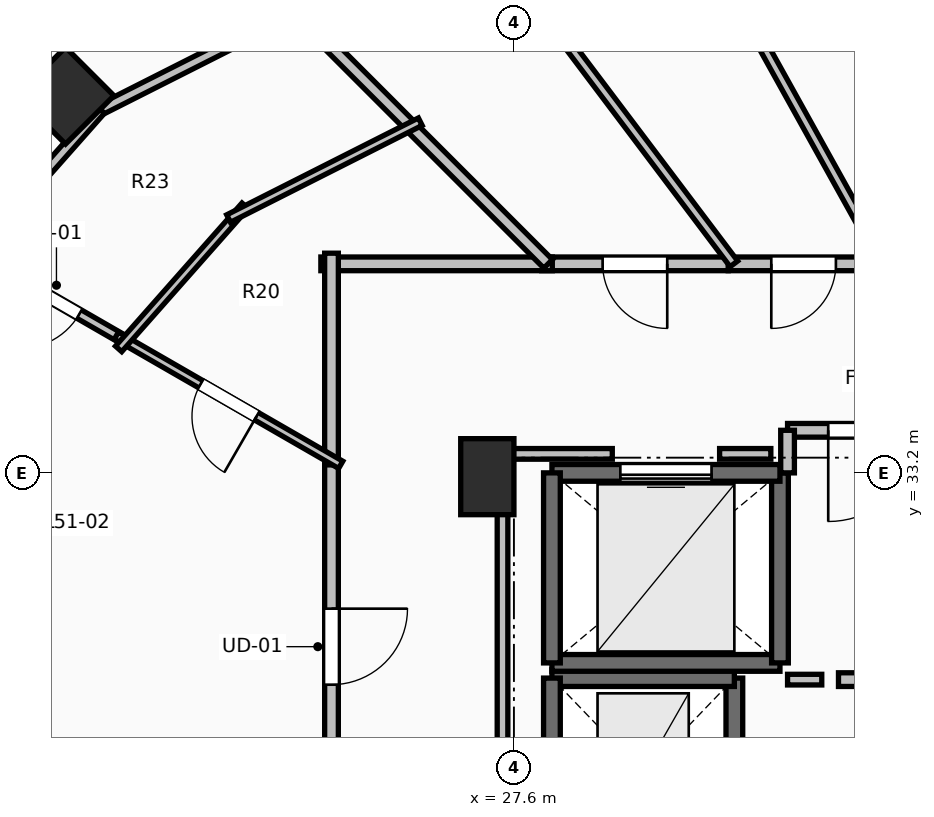
"""IFC4 building model, lengths in metres.
Left out: names, types, materials, properties, quantities, classifications, styles, units other than length and angle.
Written with IfcOpenShell. Run it as: python <this file> out.ifc"""

import sys

from ifc_helpers import new_model, si_unit, direction, frame, frame_2d, origin, origin_2d, place, context, subcontext, project, spatial, rectangle, extrude, element, fill, save


model = new_model("IFC4")
c1 = context("Model", 3, precision=1e-05, world=origin(), true_north=direction((0.0, 1.0)))
c2 = subcontext(c1, "Body", "Model", "MODEL_VIEW")
j1 = project(units=[si_unit("LENGTHUNIT", "METRE"), si_unit("PLANEANGLEUNIT", "RADIAN")], contexts=[c1])
p1 = place(None, origin())
s1 = spatial("IfcSite", under=j1, at=p1, CompositionType="ELEMENT")
p2 = place(p1, origin())
s2 = spatial("IfcBuilding", under=s1, at=p2, CompositionType="ELEMENT")
p3 = place(p2, frame((0.0, 0.0, 189.6)))
s3 = spatial("IfcBuildingStorey", under=s2, at=p3, CompositionType="ELEMENT", Elevation=189.6)
p4 = place(p3, frame((21.701, 38.162, 0.0), z_axis=(0.0, 0.0, 1.0), x_axis=(-0.707106781187, 0.707106781187, 0.0)))
e1 = element("IfcColumn", 1, at=p4, inside=s3, PredefinedType="COLUMN", context=c2, shape_type="SweptSolid", body=[
    extrude(rectangle(XDim=0.9, YDim=0.9, at=origin_2d()), origin(), (0.0, 0.0, 1.0), 3.5),
])
p5 = place(p3, frame((27.25, 33.15, 0.0), z_axis=(0.0, 0.0, 1.0), x_axis=(1.0, 0.0, 0.0)))
e2 = element("IfcColumn", 2, at=p5, inside=s3, PredefinedType="PILASTER", context=c2, shape_type="SweptSolid", body=[
    extrude(rectangle(XDim=0.7, YDim=1.0, at=origin_2d()), origin(), (0.0, 0.0, 1.0), 3.5),
])
p6 = place(p3, frame((30.5, 28.0, 0.0), z_axis=(0.0, 0.0, 1.0), x_axis=(0.0, 1.0, 0.0)))
e3 = element("IfcWall", 3, at=p6, inside=s3, PredefinedType="SHEAR", context=c2, shape_type="SweptSolid", body=[
    extrude(rectangle(XDim=2.5, YDim=0.22, at=frame_2d((1.25, 0.0))), origin(), (0.0, 0.0, 1.0), 3.24),
])
p7 = place(p3, frame((30.5, 30.5, 0.0), z_axis=(0.0, 0.0, 1.0), x_axis=(-1.0, 0.0, 0.0)))
e4 = element("IfcWall", 4, at=p7, inside=s3, PredefinedType="SHEAR", context=c2, shape_type="SweptSolid", body=[
    extrude(rectangle(XDim=2.4, YDim=0.22, at=frame_2d((1.2, 0.0))), origin(), (0.0, 0.0, 1.0), 3.24),
])
p8 = place(p3, frame((28.1, 30.5, 0.0), z_axis=(0.0, 0.0, 1.0), x_axis=(0.0, -1.0, 0.0)))
e5 = element("IfcWall", 5, at=p8, inside=s3, PredefinedType="SHEAR", context=c2, shape_type="SweptSolid", body=[
    extrude(rectangle(XDim=2.5, YDim=0.22, at=frame_2d((1.25, 0.0))), origin(), (0.0, 0.0, 1.0), 3.24),
])
p9 = place(p3, frame((28.1, 30.7, 0.0), z_axis=(0.0, 0.0, 1.0), x_axis=(1.0, 0.0, 0.0)))
e6 = element("IfcWall", 6, at=p9, inside=s3, PredefinedType="SOLIDWALL", context=c2, shape_type="SweptSolid", body=[
    extrude(rectangle(XDim=3.0, YDim=0.22, at=frame_2d((1.5, 0.0))), origin(), (0.0, 0.0, 1.0), 3.24),
])
p10 = place(p3, frame((31.1, 30.7, 0.0), z_axis=(0.0, 0.0, 1.0), x_axis=(0.0, 1.0, 0.0)))
e7 = element("IfcWall", 7, at=p10, inside=s3, PredefinedType="SOLIDWALL", context=c2, shape_type="SweptSolid", body=[
    extrude(rectangle(XDim=2.5, YDim=0.22, at=frame_2d((1.25, 0.0))), origin(), (0.0, 0.0, 1.0), 3.24),
])
p11 = place(p3, frame((31.1, 33.2, 0.0), z_axis=(0.0, 0.0, 1.0), x_axis=(-1.0, 0.0, 0.0)))
e8 = element("IfcWall", 8, at=p11, inside=s3, PredefinedType="SOLIDWALL", context=c2, shape_type="SweptSolid", body=[
    extrude(rectangle(XDim=3.0, YDim=0.22, at=frame_2d((1.5, 0.0))), origin(), (0.0, 0.0, 1.0), 3.24),
])
p12 = place(p11, frame((0.9, 0.0, 0.0)))
e9 = element("IfcOpeningElement", 9, at=p12, cuts=e8, PredefinedType="OPENING", context=c2, shape_type="SweptSolid", body=[
    extrude(rectangle(XDim=1.2, YDim=2.2, at=frame_2d((0.6, 1.1))), frame((0.0, 0.125, 0.0), z_axis=(0.0, -1.0, 0.0), x_axis=(1.0, 0.0, 0.0)), (0.0, 0.0, 1.0), 0.25),
])
p13 = place(p3, frame((28.1, 33.2, 0.0), z_axis=(0.0, 0.0, 1.0), x_axis=(0.0, -1.0, 0.0)))
e10 = element("IfcWall", 10, at=p13, inside=s3, PredefinedType="SOLIDWALL", context=c2, shape_type="SweptSolid", body=[
    extrude(rectangle(XDim=2.5, YDim=0.22, at=frame_2d((1.25, 0.0))), origin(), (0.0, 0.0, 1.0), 3.24),
])
p14 = place(p3, frame((31.87, 30.48, 0.0), z_axis=(0.0, 0.0, 1.0), x_axis=(1.0, 0.0, 0.0)))
e11 = element("IfcWall", 11, at=p14, inside=s3, PredefinedType="PARTITIONING", context=c2, shape_type="SweptSolid", body=[
    extrude(rectangle(XDim=1.6, YDim=0.18, at=frame_2d((0.8, 0.0))), origin(), (0.0, 0.0, 1.0), 3.24),
])
p15 = place(p3, frame((33.47, 33.76, 0.0), z_axis=(0.0, 0.0, 1.0), x_axis=(-1.0, 0.0, 0.0)))
e12 = element("IfcWall", 12, at=p15, inside=s3, PredefinedType="PARTITIONING", context=c2, shape_type="SweptSolid", body=[
    extrude(rectangle(XDim=2.27, YDim=0.18, at=frame_2d((1.135, 0.0))), origin(), (0.0, 0.0, 1.0), 3.24),
])
p16 = place(p15, frame((0.535, 0.0, 0.0)))
e13 = element("IfcOpeningElement", 13, at=p16, cuts=e12, PredefinedType="OPENING", context=c2, shape_type="SweptSolid", body=[
    extrude(rectangle(XDim=1.2, YDim=2.15, at=frame_2d((0.6, 1.075))), frame((0.0, 0.105, 0.0), z_axis=(0.0, -1.0, 0.0), x_axis=(1.0, 0.0, 0.0)), (0.0, 0.0, 1.0), 0.21),
])
p17 = place(p3, frame((31.2, 33.76, 0.0), z_axis=(0.0, 0.0, 1.0), x_axis=(0.0, -1.0, 0.0)))
e14 = element("IfcWall", 14, at=p17, inside=s3, PredefinedType="PARTITIONING", context=c2, shape_type="SweptSolid", body=[
    extrude(rectangle(XDim=0.56, YDim=0.18, at=frame_2d((0.28, 0.0))), origin(), (0.0, 0.0, 1.0), 3.24),
])
p18 = place(p3, frame((32.403, 35.95, 0.0), z_axis=(0.0, 0.0, 1.0), x_axis=(-1.0, 0.0, 0.0)))
e15 = element("IfcWall", 15, at=p18, inside=s3, PredefinedType="PARTITIONING", context=c2, shape_type="SweptSolid", body=[
    extrude(rectangle(XDim=1.984, YDim=0.18, at=frame_2d((0.992, 0.0))), origin(), (0.0, 0.0, 1.0), 2.432),
])
p19 = place(p18, frame((0.567, 0.0, 0.0)))
e16 = element("IfcOpeningElement", 16, at=p19, cuts=e15, PredefinedType="OPENING", context=c2, shape_type="SweptSolid", body=[
    extrude(rectangle(XDim=0.85, YDim=2.1, at=frame_2d((0.425, 1.05))), frame((0.0, 0.105, 0.0), z_axis=(0.0, -1.0, 0.0), x_axis=(1.0, 0.0, 0.0)), (0.0, 0.0, 1.0), 0.21),
])
p20 = place(p3, frame((30.419, 35.95, 0.0), z_axis=(0.0, 0.0, 1.0), x_axis=(-1.0, 0.0, 0.0)))
e17 = element("IfcWall", 17, at=p20, inside=s3, PredefinedType="PARTITIONING", context=c2, shape_type="SweptSolid", body=[
    extrude(rectangle(XDim=2.454, YDim=0.18, at=frame_2d((1.227, 0.0))), origin(), (0.0, 0.0, 1.0), 2.432),
])
p21 = place(p20, frame((0.802, 0.0, 0.0)))
e18 = element("IfcOpeningElement", 18, at=p21, cuts=e17, PredefinedType="OPENING", context=c2, shape_type="SweptSolid", body=[
    extrude(rectangle(XDim=0.85, YDim=2.1, at=frame_2d((0.425, 1.05))), frame((0.0, 0.105, 0.0), z_axis=(0.0, -1.0, 0.0), x_axis=(1.0, 0.0, 0.0)), (0.0, 0.0, 1.0), 0.21),
])
p22 = place(p3, frame((25.2, 33.445, 0.0), z_axis=(0.0, 0.0, 1.0), x_axis=(0.0, -1.0, 0.0)))
e19 = element("IfcWall", 19, at=p22, inside=s3, PredefinedType="PARTITIONING", context=c2, shape_type="SweptSolid", body=[
    extrude(rectangle(XDim=5.063, YDim=0.18, at=frame_2d((2.531, 0.0))), origin(), (0.0, 0.0, 1.0), 2.432),
])
p23 = place(p22, frame((2.031, 0.0, 0.0)))
e20 = element("IfcOpeningElement", 20, at=p23, cuts=e19, PredefinedType="OPENING", context=c2, shape_type="SweptSolid", body=[
    extrude(rectangle(XDim=1.0, YDim=2.15, at=frame_2d((0.5, 1.075))), frame((0.0, 0.105, 0.0), z_axis=(0.0, -1.0, 0.0), x_axis=(1.0, 0.0, 0.0)), (0.0, 0.0, 1.0), 0.21),
])
p24 = place(p3, frame((28.105, 35.95, 0.0), z_axis=(0.0, 0.0, 1.0), x_axis=(-1.0, 0.0, 0.0)))
e21 = element("IfcWall", 21, at=p24, inside=s3, PredefinedType="PARTITIONING", context=c2, shape_type="SweptSolid", body=[
    extrude(rectangle(XDim=3.045, YDim=0.18, at=frame_2d((1.522, 0.0))), origin(), (0.0, 0.0, 1.0), 2.432),
])
p25 = place(p3, frame((25.2, 36.09, 0.0), z_axis=(0.0, 0.0, 1.0), x_axis=(0.0, -1.0, 0.0)))
e22 = element("IfcWall", 22, at=p25, inside=s3, PredefinedType="PARTITIONING", context=c2, shape_type="SweptSolid", body=[
    extrude(rectangle(XDim=2.785, YDim=0.18, at=frame_2d((1.393, 0.0))), origin(), (0.0, 0.0, 1.0), 2.432),
])
p26 = place(p3, frame((30.135, 46.398, 0.0), z_axis=(0.0, 0.0, 1.0), x_axis=(0.359727007777, -0.933057597298, 0.0)))
e23 = element("IfcWall", 23, at=p26, inside=s3, PredefinedType="PARTITIONING", context=c2, shape_type="SweptSolid", body=[
    extrude(rectangle(XDim=11.198, YDim=0.125, at=frame_2d((5.599, 0.0))), origin(), (0.0, 0.0, 1.0), 2.432),
])
p27 = place(p3, frame((27.069, 45.673, 0.0), z_axis=(0.0, 0.0, 1.0), x_axis=(0.485717471054, -0.874115860921, 0.0)))
e24 = element("IfcWall", 24, at=p27, inside=s3, PredefinedType="PARTITIONING", context=c2, shape_type="SweptSolid", body=[
    extrude(rectangle(XDim=11.123, YDim=0.125, at=frame_2d((5.562, 0.0))), origin(), (0.0, 0.0, 1.0), 2.432),
])
p28 = place(p3, frame((24.075, 44.46, 0.0), z_axis=(0.0, 0.0, 1.0), x_axis=(0.602185523072, -0.798356183544, 0.0)))
e25 = element("IfcWall", 25, at=p28, inside=s3, PredefinedType="PARTITIONING", context=c2, shape_type="SweptSolid", body=[
    extrude(rectangle(XDim=10.659, YDim=0.125, at=frame_2d((5.33, 0.0))), origin(), (0.0, 0.0, 1.0), 2.432),
])
p29 = place(p3, frame((21.041, 42.959, 0.0), z_axis=(0.0, 0.0, 1.0), x_axis=(0.707106781187, -0.707106781187, 0.0)))
e26 = element("IfcWall", 26, at=p29, inside=s3, PredefinedType="PARTITIONING", context=c2, shape_type="SweptSolid", body=[
    extrude(rectangle(XDim=9.912, YDim=0.16, at=frame_2d((4.956, 0.0))), origin(), (0.0, 0.0, 1.0), 2.432),
])
p30 = place(p3, frame((22.492, 34.936, 0.0), z_axis=(0.0, 0.0, 1.0), x_axis=(-0.866435390844, 0.499289208267, 0.0)))
e27 = element("IfcWall", 27, at=p30, inside=s3, PredefinedType="PARTITIONING", context=c2, shape_type="SweptSolid", body=[
    extrude(rectangle(XDim=2.309, YDim=0.125, at=frame_2d((1.155, 0.0))), origin(), (0.0, 0.0, 1.0), 2.922),
])
p31 = place(p30, frame((0.705, 0.0, 0.0)))
e28 = element("IfcOpeningElement", 28, at=p31, cuts=e27, PredefinedType="OPENING", context=c2, shape_type="SweptSolid", body=[
    extrude(rectangle(XDim=0.9, YDim=2.1, at=frame_2d((0.45, 1.05))), frame((0.0, 0.077, 0.0), z_axis=(0.0, -1.0, 0.0), x_axis=(1.0, 0.0, 0.0)), (0.0, 0.0, 1.0), 0.155),
])
p32 = place(p3, frame((25.321, 33.306, 0.0), z_axis=(0.0, 0.0, 1.0), x_axis=(-0.866517217622, 0.49914718427, 0.0)))
e29 = element("IfcWall", 29, at=p32, inside=s3, PredefinedType="PARTITIONING", context=c2, shape_type="SweptSolid", body=[
    extrude(rectangle(XDim=3.405, YDim=0.11, at=frame_2d((1.703, 0.0))), origin(), (0.0, 0.0, 1.0), 2.922),
])
p33 = place(p32, frame((1.278, 0.0, 0.0)))
e30 = element("IfcOpeningElement", 30, at=p33, cuts=e29, PredefinedType="OPENING", context=c2, shape_type="SweptSolid", body=[
    extrude(rectangle(XDim=0.85, YDim=2.1, at=frame_2d((0.425, 1.05))), frame((0.0, 0.07, 0.0), z_axis=(0.0, -1.0, 0.0), x_axis=(1.0, 0.0, 0.0)), (0.0, 0.0, 1.0), 0.14),
])
p34 = place(p3, frame((15.451, 30.302, 0.0), z_axis=(0.0, 0.0, 1.0), x_axis=(0.982284698783, -0.187394691859, 0.0)))
e31 = element("IfcWall", 31, at=p34, inside=s3, PredefinedType="PARTITIONING", context=c2, shape_type="SweptSolid", body=[
    extrude(rectangle(XDim=9.925, YDim=0.125, at=frame_2d((4.962, 0.0))), origin(), (0.0, 0.0, 1.0), 2.774),
])
p35 = place(p34, frame((4.512, 0.0, 0.0)))
e32 = element("IfcOpeningElement", 32, at=p35, cuts=e31, PredefinedType="OPENING", context=c2, shape_type="SweptSolid", body=[
    extrude(rectangle(XDim=0.9, YDim=2.1, at=frame_2d((0.45, 1.05))), frame((0.0, 0.077, 0.0), z_axis=(0.0, -1.0, 0.0), x_axis=(1.0, 0.0, 0.0)), (0.0, 0.0, 1.0), 0.155),
])
p36 = place(p3, frame((22.399, 34.831, 0.0), z_axis=(0.0, 0.0, 1.0), x_axis=(0.662292938072, 0.749244996099, 0.0)))
e33 = element("IfcWall", 33, at=p36, inside=s3, PredefinedType="PARTITIONING", context=c2, shape_type="SweptSolid", body=[
    extrude(rectangle(XDim=2.513, YDim=0.11, at=frame_2d((1.256, 0.0))), origin(), (0.0, 0.0, 1.0), 2.432),
])
p37 = place(p3, frame((23.846, 36.546, 0.0), z_axis=(0.0, 0.0, 1.0), x_axis=(0.892553076465, 0.450942352959, 0.0)))
e34 = element("IfcWall", 34, at=p37, inside=s3, PredefinedType="PARTITIONING", context=c2, shape_type="SweptSolid", body=[
    extrude(rectangle(XDim=2.826, YDim=0.11, at=frame_2d((1.413, 0.0))), origin(), (0.0, 0.0, 1.0), 2.432),
])
p38 = place(p3, frame((31.2, 30.48, 0.0), z_axis=(0.0, 0.0, 1.0), x_axis=(1.0, 0.0, 0.0)))
e35 = element("IfcWall", 35, at=p38, inside=s3, PredefinedType="PARTITIONING", context=c2, shape_type="SweptSolid", body=[
    extrude(rectangle(XDim=0.45, YDim=0.14, at=frame_2d((0.225, 0.0))), origin(), (0.0, 0.0, 1.0), 3.24),
])
p39 = place(p3, frame((30.98, 33.45, 0.0), z_axis=(0.0, 0.0, 1.0), x_axis=(-1.0, 0.0, 0.0)))
e36 = element("IfcWall", 36, at=p39, inside=s3, PredefinedType="PARTITIONING", context=c2, shape_type="SweptSolid", body=[
    extrude(rectangle(XDim=0.674, YDim=0.14, at=frame_2d((0.337, 0.0))), origin(), (0.0, 0.0, 1.0), 3.24),
])
p40 = place(p3, frame((28.894, 33.45, 0.0), z_axis=(0.0, 0.0, 1.0), x_axis=(-1.0, 0.0, 0.0)))
e37 = element("IfcWall", 37, at=p40, inside=s3, PredefinedType="PARTITIONING", context=c2, shape_type="SweptSolid", body=[
    extrude(rectangle(XDim=1.444, YDim=0.14, at=frame_2d((0.722, 0.0))), origin(), (0.0, 0.0, 1.0), 2.432),
])
p41 = place(p3, frame((27.45, 33.45, 0.0), z_axis=(0.0, 0.0, 1.0), x_axis=(0.0, -1.0, 0.0)))
e38 = element("IfcWall", 38, at=p41, inside=s3, PredefinedType="PARTITIONING", context=c2, shape_type="SweptSolid", body=[
    extrude(rectangle(XDim=5.254, YDim=0.14, at=frame_2d((2.627, 0.0))), origin(), (0.0, 0.0, 1.0), 2.432),
])
p42 = place(p3, frame((24.519, 39.17, 0.0), z_axis=(0.0, 0.0, 1.0), x_axis=(-0.89247840077, -0.451090128643, 0.0)))
e39 = element("IfcWall", 39, at=p42, inside=s3, PredefinedType="PARTITIONING", context=c2, shape_type="SweptSolid", body=[
    extrude(rectangle(XDim=2.642, YDim=0.14, at=frame_2d((1.321, 0.0))), origin(), (0.0, 0.0, 1.0), 2.432),
])
p43 = place(p3, frame((22.161, 37.978, 0.0), z_axis=(0.0, 0.0, 1.0), x_axis=(-0.662476802918, -0.749082429106, 0.0)))
e40 = element("IfcWall", 40, at=p43, inside=s3, PredefinedType="PARTITIONING", context=c2, shape_type="SweptSolid", body=[
    extrude(rectangle(XDim=2.171, YDim=0.14, at=frame_2d((1.085, 0.0))), origin(), (0.0, 0.0, 1.0), 2.432),
])
p44 = place(p12, origin())
e41 = element("IfcDoor", 41, at=p44, inside=s3, OperationType="SLIDING_TO_LEFT", PredefinedType="DOOR", context=c2, shape_type="SweptSolid", body=[
    extrude(rectangle(XDim=1.2, YDim=2.2, at=frame_2d((0.6, 1.1))), frame((0.0, 0.025, 0.0), z_axis=(0.0, -1.0, 0.0), x_axis=(1.0, 0.0, 0.0)), (0.0, 0.0, 1.0), 0.05),
])
fill(e9, e41)
p45 = place(p16, origin())
e42 = element("IfcDoor", 42, at=p45, inside=s3, OperationType="SINGLE_SWING_RIGHT", PredefinedType="DOOR", context=c2, shape_type="SweptSolid", body=[
    extrude(rectangle(XDim=1.2, YDim=2.15, at=frame_2d((0.6, 1.075))), frame((0.0, 0.025, 0.0), z_axis=(0.0, -1.0, 0.0), x_axis=(1.0, 0.0, 0.0)), (0.0, 0.0, 1.0), 0.05),
])
fill(e13, e42)
p46 = place(p23, origin())
e43 = element("IfcDoor", 43, at=p46, inside=s3, OperationType="SINGLE_SWING_LEFT", PredefinedType="DOOR", context=c2, shape_type="SweptSolid", body=[
    extrude(rectangle(XDim=1.0, YDim=2.15, at=frame_2d((0.5, 1.075))), frame((0.0, 0.025, 0.0), z_axis=(0.0, -1.0, 0.0), x_axis=(1.0, 0.0, 0.0)), (0.0, 0.0, 1.0), 0.05),
])
fill(e20, e43)
p47 = place(p31, origin())
e44 = element("IfcDoor", 44, at=p47, inside=s3, OperationType="SINGLE_SWING_RIGHT", PredefinedType="DOOR", context=c2, shape_type="SweptSolid", body=[
    extrude(rectangle(XDim=0.9, YDim=2.1, at=frame_2d((0.45, 1.05))), frame((0.0, 0.025, 0.0), z_axis=(0.0, -1.0, 0.0), x_axis=(1.0, 0.0, 0.0)), (0.0, 0.0, 1.0), 0.05),
])
fill(e28, e44)
p48 = place(p33, origin())
e45 = element("IfcDoor", 45, at=p48, inside=s3, OperationType="SINGLE_SWING_LEFT", PredefinedType="DOOR", context=c2, shape_type="SweptSolid", body=[
    extrude(rectangle(XDim=0.85, YDim=2.1, at=frame_2d((0.425, 1.05))), frame((0.0, 0.025, 0.0), z_axis=(0.0, -1.0, 0.0), x_axis=(1.0, 0.0, 0.0)), (0.0, 0.0, 1.0), 0.05),
])
fill(e30, e45)
p49 = place(p19, origin())
e46 = element("IfcDoor", 46, at=p49, inside=s3, OperationType="SINGLE_SWING_RIGHT", PredefinedType="DOOR", context=c2, shape_type="SweptSolid", body=[
    extrude(rectangle(XDim=0.85, YDim=2.1, at=frame_2d((0.425, 1.05))), frame((0.0, 0.025, 0.0), z_axis=(0.0, -1.0, 0.0), x_axis=(1.0, 0.0, 0.0)), (0.0, 0.0, 1.0), 0.05),
])
fill(e16, e46)
p50 = place(p21, origin())
e47 = element("IfcDoor", 47, at=p50, inside=s3, OperationType="SINGLE_SWING_LEFT", PredefinedType="DOOR", context=c2, shape_type="SweptSolid", body=[
    extrude(rectangle(XDim=0.85, YDim=2.1, at=frame_2d((0.425, 1.05))), frame((0.0, 0.025, 0.0), z_axis=(0.0, -1.0, 0.0), x_axis=(1.0, 0.0, 0.0)), (0.0, 0.0, 1.0), 0.05),
])
fill(e18, e47)
save(model, sys.argv[1])
